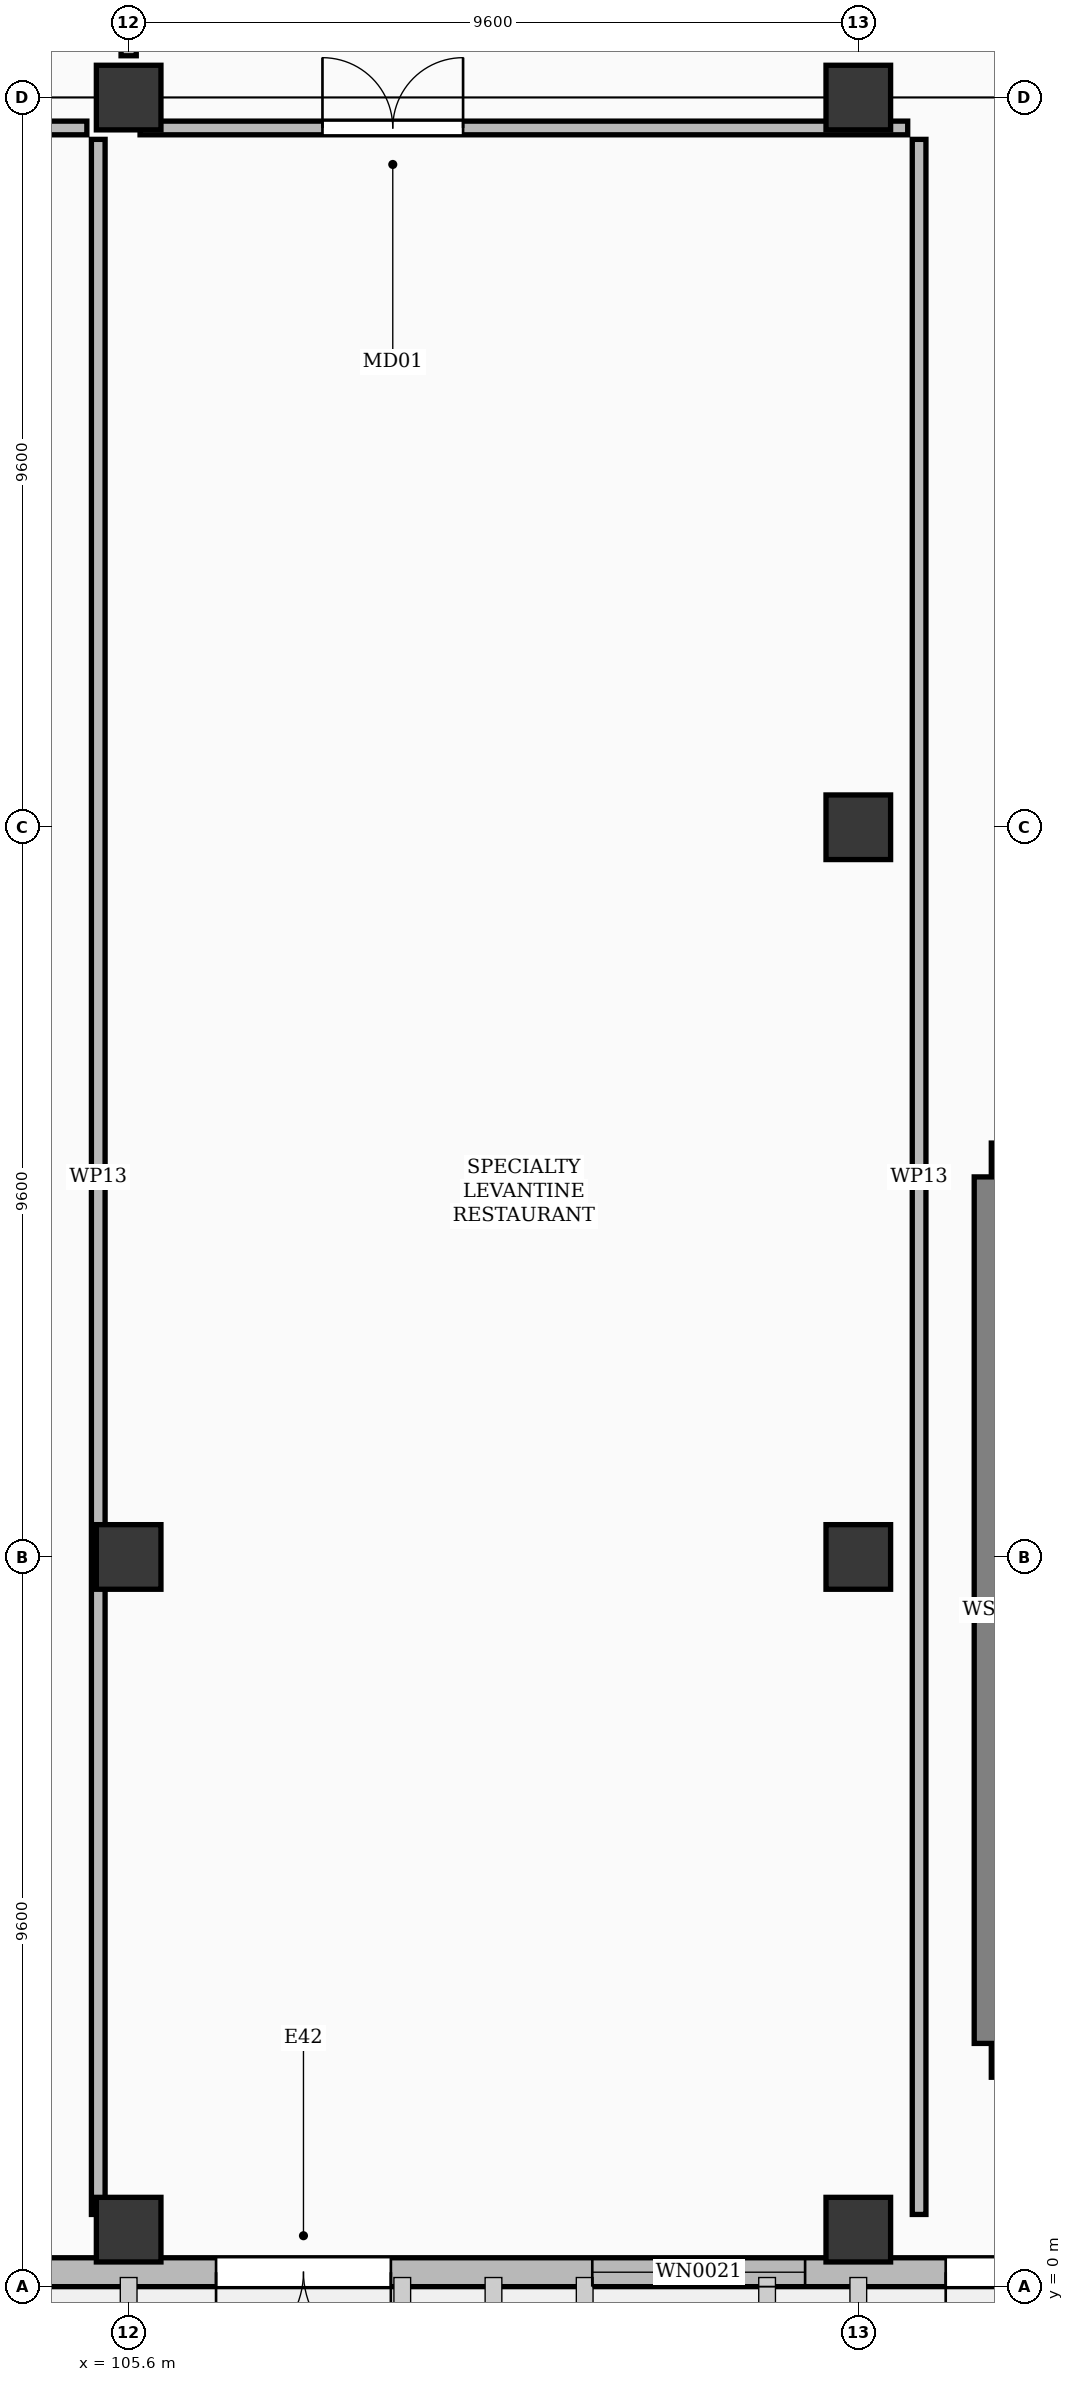
"""IFC4 building model, lengths in metres.
Left out: names, types, materials, properties, quantities, classifications, styles, units other than length and angle.
Written with IfcOpenShell. Run it as: python <this file> out.ifc"""

import sys

from ifc_helpers import new_model, si_unit, direction, frame, frame_2d, origin, origin_2d, place, context, subcontext, project, spatial, rectangle, extrude, element, fill, save


model = new_model("IFC4")
c1 = context("Model", 3, precision=1e-05, world=origin(), true_north=direction((0.0, 1.0)))
c2 = subcontext(c1, "Body", "Model", "MODEL_VIEW")
j1 = project(units=[si_unit("LENGTHUNIT", "METRE"), si_unit("PLANEANGLEUNIT", "RADIAN")], contexts=[c1])
p1 = place(None, origin())
s1 = spatial("IfcSite", under=j1, at=p1, CompositionType="ELEMENT")
p2 = place(p1, origin())
s2 = spatial("IfcBuilding", under=s1, at=p2, CompositionType="ELEMENT")
p3 = place(p2, origin())
s3 = spatial("IfcBuildingStorey", under=s2, at=p3, CompositionType="ELEMENT", Elevation=0.0)
for number, where, z_axis, x_axis in (
    (1, (105.6, 0.75, 0.0), (0.0, 0.0, 1.0), (1.0, 0.0, 0.0)),
    (2, (105.6, 9.6, 0.0), (0.0, 0.0, 1.0), (1.0, 0.0, 0.0)),
    (3, (105.6, 28.8, 0.0), (0.0, 0.0, 1.0), (1.0, 0.0, 0.0)),
    (4, (115.2, 0.75, 0.0), (0.0, 0.0, 1.0), (1.0, 0.0, 0.0)),
    (5, (115.2, 9.6, 0.0), (0.0, 0.0, 1.0), (1.0, 0.0, 0.0)),
    (6, (115.2, 19.2, 0.0), (0.0, 0.0, 1.0), (1.0, 0.0, 0.0)),
    (7, (115.2, 28.8, 0.0), (0.0, 0.0, 1.0), (1.0, 0.0, 0.0)),
):
    element("IfcColumn", number, at=place(p3, frame(where, z_axis=z_axis, x_axis=x_axis)), inside=s3, PredefinedType="COLUMN", context=c2, shape_type="SweptSolid", body=[
        extrude(rectangle(XDim=0.85, YDim=0.85, at=origin_2d()), origin(), (0.0, 0.0, 1.0), 6.0),
    ])
p4 = place(p3, frame((179.65, 0.19, 0.0), z_axis=(0.0, 0.0, 1.0), x_axis=(-1.0, 0.0, 0.0)))
e8 = element("IfcWall", 8, at=p4, inside=s3, PredefinedType="SOLIDWALL", context=c2, shape_type="SweptSolid", body=[
    extrude(rectangle(XDim=121.9, YDim=0.38, at=frame_2d((60.95, 0.0))), origin(), (0.0, 0.0, 1.0), 5.142),
])
p5 = place(p4, frame((3.4, 0.0, 0.0)))
e9 = element("IfcOpeningElement", 9, at=p5, cuts=e8, PredefinedType="OPENING", context=c2, shape_type="SweptSolid", body=[
    extrude(rectangle(XDim=2.3, YDim=2.4, at=frame_2d((1.15, 1.2))), frame((0.0, 0.202, 0.0), z_axis=(0.0, -1.0, 0.0), x_axis=(1.0, 0.0, 0.0)), (0.0, 0.0, 1.0), 0.404),
])
p6 = place(p4, frame((14.05, 0.0, 0.0)))
e10 = element("IfcOpeningElement", 10, at=p6, cuts=e8, PredefinedType="OPENING", context=c2, shape_type="SweptSolid", body=[
    extrude(rectangle(XDim=2.3, YDim=2.4, at=frame_2d((1.15, 1.2))), frame((0.0, 0.202, 0.0), z_axis=(0.0, -1.0, 0.0), x_axis=(1.0, 0.0, 0.0)), (0.0, 0.0, 1.0), 0.404),
])
p7 = place(p4, frame((22.6, 0.0, 0.0)))
e11 = element("IfcOpeningElement", 11, at=p7, cuts=e8, PredefinedType="OPENING", context=c2, shape_type="SweptSolid", body=[
    extrude(rectangle(XDim=2.3, YDim=2.4, at=frame_2d((1.15, 1.2))), frame((0.0, 0.202, 0.0), z_axis=(0.0, -1.0, 0.0), x_axis=(1.0, 0.0, 0.0)), (0.0, 0.0, 1.0), 0.404),
])
p8 = place(p4, frame((32.2, 0.0, 0.0)))
e12 = element("IfcOpeningElement", 12, at=p8, cuts=e8, PredefinedType="OPENING", context=c2, shape_type="SweptSolid", body=[
    extrude(rectangle(XDim=2.3, YDim=2.4, at=frame_2d((1.15, 1.2))), frame((0.0, 0.202, 0.0), z_axis=(0.0, -1.0, 0.0), x_axis=(1.0, 0.0, 0.0)), (0.0, 0.0, 1.0), 0.404),
])
p9 = place(p4, frame((41.8, 0.0, 0.0)))
e13 = element("IfcOpeningElement", 13, at=p9, cuts=e8, PredefinedType="OPENING", context=c2, shape_type="SweptSolid", body=[
    extrude(rectangle(XDim=2.3, YDim=2.4, at=frame_2d((1.15, 1.2))), frame((0.0, 0.202, 0.0), z_axis=(0.0, -1.0, 0.0), x_axis=(1.0, 0.0, 0.0)), (0.0, 0.0, 1.0), 0.404),
])
p10 = place(p4, frame((51.4, 0.0, 0.0)))
e14 = element("IfcOpeningElement", 14, at=p10, cuts=e8, PredefinedType="OPENING", context=c2, shape_type="SweptSolid", body=[
    extrude(rectangle(XDim=2.3, YDim=2.4, at=frame_2d((1.15, 1.2))), frame((0.0, 0.202, 0.0), z_axis=(0.0, -1.0, 0.0), x_axis=(1.0, 0.0, 0.0)), (0.0, 0.0, 1.0), 0.404),
])
p11 = place(p4, frame((61.0, 0.0, 0.0)))
e15 = element("IfcOpeningElement", 15, at=p11, cuts=e8, PredefinedType="OPENING", context=c2, shape_type="SweptSolid", body=[
    extrude(rectangle(XDim=2.3, YDim=2.4, at=frame_2d((1.15, 1.2))), frame((0.0, 0.202, 0.0), z_axis=(0.0, -1.0, 0.0), x_axis=(1.0, 0.0, 0.0)), (0.0, 0.0, 1.0), 0.404),
])
p12 = place(p4, frame((70.6, 0.0, 0.0)))
e16 = element("IfcOpeningElement", 16, at=p12, cuts=e8, PredefinedType="OPENING", context=c2, shape_type="SweptSolid", body=[
    extrude(rectangle(XDim=2.3, YDim=2.4, at=frame_2d((1.15, 1.2))), frame((0.0, 0.202, 0.0), z_axis=(0.0, -1.0, 0.0), x_axis=(1.0, 0.0, 0.0)), (0.0, 0.0, 1.0), 0.404),
])
p13 = place(p4, frame((80.2, 0.0, 0.0)))
e17 = element("IfcOpeningElement", 17, at=p13, cuts=e8, PredefinedType="OPENING", context=c2, shape_type="SweptSolid", body=[
    extrude(rectangle(XDim=2.3, YDim=2.4, at=frame_2d((1.15, 1.2))), frame((0.0, 0.202, 0.0), z_axis=(0.0, -1.0, 0.0), x_axis=(1.0, 0.0, 0.0)), (0.0, 0.0, 1.0), 0.404),
])
p14 = place(p4, frame((89.8, 0.0, 0.0)))
e18 = element("IfcOpeningElement", 18, at=p14, cuts=e8, PredefinedType="OPENING", context=c2, shape_type="SweptSolid", body=[
    extrude(rectangle(XDim=2.3, YDim=2.4, at=frame_2d((1.15, 1.2))), frame((0.0, 0.202, 0.0), z_axis=(0.0, -1.0, 0.0), x_axis=(1.0, 0.0, 0.0)), (0.0, 0.0, 1.0), 0.404),
])
p15 = place(p4, frame((99.4, 0.0, 0.0)))
e19 = element("IfcOpeningElement", 19, at=p15, cuts=e8, PredefinedType="OPENING", context=c2, shape_type="SweptSolid", body=[
    extrude(rectangle(XDim=2.3, YDim=2.4, at=frame_2d((1.15, 1.2))), frame((0.0, 0.202, 0.0), z_axis=(0.0, -1.0, 0.0), x_axis=(1.0, 0.0, 0.0)), (0.0, 0.0, 1.0), 0.404),
])
p16 = place(p4, frame((109.0, 0.0, 0.0)))
e20 = element("IfcOpeningElement", 20, at=p16, cuts=e8, PredefinedType="OPENING", context=c2, shape_type="SweptSolid", body=[
    extrude(rectangle(XDim=2.3, YDim=2.4, at=frame_2d((1.15, 1.2))), frame((0.0, 0.202, 0.0), z_axis=(0.0, -1.0, 0.0), x_axis=(1.0, 0.0, 0.0)), (0.0, 0.0, 1.0), 0.404),
])
p17 = place(p4, frame((7.2, 0.0, 0.8)))
e21 = element("IfcOpeningElement", 21, at=p17, cuts=e8, PredefinedType="OPENING", context=c2, shape_type="SweptSolid", body=[
    extrude(rectangle(XDim=1.6, YDim=2.8, at=frame_2d((0.8, 1.4))), frame((0.0, 0.202, 0.0), z_axis=(0.0, -1.0, 0.0), x_axis=(1.0, 0.0, 0.0)), (0.0, 0.0, 1.0), 0.404),
])
p18 = place(p4, frame((26.4, 0.0, 0.8)))
e22 = element("IfcOpeningElement", 22, at=p18, cuts=e8, PredefinedType="OPENING", context=c2, shape_type="SweptSolid", body=[
    extrude(rectangle(XDim=2.0, YDim=2.8, at=frame_2d((1.0, 1.4))), frame((0.0, 0.202, 0.0), z_axis=(0.0, -1.0, 0.0), x_axis=(1.0, 0.0, 0.0)), (0.0, 0.0, 1.0), 0.404),
])
p19 = place(p4, frame((45.95, 0.0, 0.8)))
e23 = element("IfcOpeningElement", 23, at=p19, cuts=e8, PredefinedType="OPENING", context=c2, shape_type="SweptSolid", body=[
    extrude(rectangle(XDim=2.4, YDim=3.0, at=frame_2d((1.2, 1.5))), frame((0.0, 0.202, 0.0), z_axis=(0.0, -1.0, 0.0), x_axis=(1.0, 0.0, 0.0)), (0.0, 0.0, 1.0), 0.404),
])
p20 = place(p4, frame((65.15, 0.0, 0.8)))
e24 = element("IfcOpeningElement", 24, at=p20, cuts=e8, PredefinedType="OPENING", context=c2, shape_type="SweptSolid", body=[
    extrude(rectangle(XDim=2.8, YDim=3.2, at=frame_2d((1.4, 1.6))), frame((0.0, 0.202, 0.0), z_axis=(0.0, -1.0, 0.0), x_axis=(1.0, 0.0, 0.0)), (0.0, 0.0, 1.0), 0.404),
])
p21 = place(p4, frame((84.35, 0.0, 0.8)))
e25 = element("IfcOpeningElement", 25, at=p21, cuts=e8, PredefinedType="OPENING", context=c2, shape_type="SweptSolid", body=[
    extrude(rectangle(XDim=1.4, YDim=2.5, at=frame_2d((0.7, 1.25))), frame((0.0, 0.202, 0.0), z_axis=(0.0, -1.0, 0.0), x_axis=(1.0, 0.0, 0.0)), (0.0, 0.0, 1.0), 0.404),
])
for number, where, z_axis, x_axis in (
    (26, (116.95, 2.98, 0.0), (0.0, 0.0, 1.0), (1.0, 0.0, 0.0)),
    (27, (116.95, 14.82, 0.0), (0.0, 0.0, 1.0), (1.0, 0.0, 0.0)),
):
    element("IfcWall", number, at=place(p3, frame(where, z_axis=z_axis, x_axis=x_axis)), inside=s3, PredefinedType="SHEAR", context=c2, shape_type="SweptSolid", body=[
        extrude(rectangle(XDim=5.15, YDim=0.45, at=frame_2d((2.575, 0.0))), origin(), (0.0, 0.0, 1.0), 5.7),
    ])
p22 = place(p3, frame((116.95, 3.2, 0.0), z_axis=(0.0, 0.0, 1.0), x_axis=(0.0, 1.0, 0.0)))
e28 = element("IfcWall", 28, at=p22, inside=s3, PredefinedType="SHEAR", context=c2, shape_type="SweptSolid", body=[
    extrude(rectangle(XDim=11.4, YDim=0.45, at=frame_2d((5.7, 0.0))), origin(), (0.0, 0.0, 1.0), 5.7),
])
p23 = place(p3, frame((105.6, 29.35, 0.0), z_axis=(0.0, 0.0, 1.0), x_axis=(0.0, 1.0, 0.0)))
e29 = element("IfcWall", 29, at=p23, inside=s3, PredefinedType="PARTITIONING", context=c2, shape_type="SweptSolid", body=[
    extrude(rectangle(XDim=11.1, YDim=0.2, at=frame_2d((5.55, 0.0))), origin(), (0.0, 0.0, 1.0), 4.692),
])
p24 = place(p3, frame((65.75, 28.4, 0.0), z_axis=(0.0, 0.0, 1.0), x_axis=(1.0, 0.0, 0.0)))
e30 = element("IfcWall", 30, at=p24, inside=s3, PredefinedType="PARTITIONING", context=c2, shape_type="SweptSolid", body=[
    extrude(rectangle(XDim=39.3, YDim=0.18, at=frame_2d((19.65, 0.0))), origin(), (0.0, 0.0, 1.0), 4.692),
])
p25 = place(p24, frame((11.85, 0.0, 0.0)))
e31 = element("IfcOpeningElement", 31, at=p25, cuts=e30, PredefinedType="OPENING", context=c2, shape_type="SweptSolid", body=[
    extrude(rectangle(XDim=1.85, YDim=2.35, at=frame_2d((0.925, 1.175))), frame((0.0, 0.102, 0.0), z_axis=(0.0, -1.0, 0.0), x_axis=(1.0, 0.0, 0.0)), (0.0, 0.0, 1.0), 0.204),
])
p26 = place(p24, frame((34.4, 0.0, 0.0)))
e32 = element("IfcOpeningElement", 32, at=p26, cuts=e30, PredefinedType="OPENING", context=c2, shape_type="SweptSolid", body=[
    extrude(rectangle(XDim=1.85, YDim=2.35, at=frame_2d((0.925, 1.175))), frame((0.0, 0.102, 0.0), z_axis=(0.0, -1.0, 0.0), x_axis=(1.0, 0.0, 0.0)), (0.0, 0.0, 1.0), 0.204),
])
p27 = place(p24, frame((21.55, 0.0, 0.0)))
e33 = element("IfcOpeningElement", 33, at=p27, cuts=e30, PredefinedType="OPENING", context=c2, shape_type="SweptSolid", body=[
    extrude(rectangle(XDim=1.85, YDim=2.35, at=frame_2d((0.925, 1.175))), frame((0.0, 0.102, 0.0), z_axis=(0.0, -1.0, 0.0), x_axis=(1.0, 0.0, 0.0)), (0.0, 0.0, 1.0), 0.204),
])
p28 = place(p3, frame((105.2, 0.95, 0.0), z_axis=(0.0, 0.0, 1.0), x_axis=(0.0, 1.0, 0.0)))
e34 = element("IfcWall", 34, at=p28, inside=s3, PredefinedType="PARTITIONING", context=c2, shape_type="SweptSolid", body=[
    extrude(rectangle(XDim=27.3, YDim=0.18, at=frame_2d((13.65, 0.0))), origin(), (0.0, 0.0, 1.0), 4.692),
])
p29 = place(p3, frame((105.75, 28.4, 0.0), z_axis=(0.0, 0.0, 1.0), x_axis=(1.0, 0.0, 0.0)))
e35 = element("IfcWall", 35, at=p29, inside=s3, PredefinedType="PARTITIONING", context=c2, shape_type="SweptSolid", body=[
    extrude(rectangle(XDim=10.1, YDim=0.18, at=frame_2d((5.05, 0.0))), origin(), (0.0, 0.0, 1.0), 4.692),
])
p30 = place(p29, frame((2.4, 0.0, 0.0)))
e36 = element("IfcOpeningElement", 36, at=p30, cuts=e35, PredefinedType="OPENING", context=c2, shape_type="SweptSolid", body=[
    extrude(rectangle(XDim=1.85, YDim=2.35, at=frame_2d((0.925, 1.175))), frame((0.0, 0.102, 0.0), z_axis=(0.0, -1.0, 0.0), x_axis=(1.0, 0.0, 0.0)), (0.0, 0.0, 1.0), 0.204),
])
p31 = place(p3, frame((116.0, 0.95, 0.0), z_axis=(0.0, 0.0, 1.0), x_axis=(0.0, 1.0, 0.0)))
e37 = element("IfcWall", 37, at=p31, inside=s3, PredefinedType="PARTITIONING", context=c2, shape_type="SweptSolid", body=[
    extrude(rectangle(XDim=27.3, YDim=0.18, at=frame_2d((13.65, 0.0))), origin(), (0.0, 0.0, 1.0), 4.692),
])
p32 = place(p11, origin())
e38 = element("IfcDoor", 38, at=p32, inside=s3, OperationType="DOUBLE_DOOR_SINGLE_SWING", PredefinedType="DOOR", context=c2, shape_type="SweptSolid", body=[
    extrude(rectangle(XDim=2.3, YDim=2.4, at=frame_2d((1.15, 1.2))), frame((0.0, 0.025, 0.0), z_axis=(0.0, -1.0, 0.0), x_axis=(1.0, 0.0, 0.0)), (0.0, 0.0, 1.0), 0.05),
])
fill(e15, e38)
p33 = place(p12, origin())
e39 = element("IfcDoor", 39, at=p33, inside=s3, OperationType="DOUBLE_DOOR_SINGLE_SWING", PredefinedType="DOOR", context=c2, shape_type="SweptSolid", body=[
    extrude(rectangle(XDim=2.3, YDim=2.4, at=frame_2d((1.15, 1.2))), frame((0.0, 0.025, 0.0), z_axis=(0.0, -1.0, 0.0), x_axis=(1.0, 0.0, 0.0)), (0.0, 0.0, 1.0), 0.05),
])
fill(e16, e39)
p34 = place(p20, origin())
e40 = element("IfcWindow", 40, at=p34, inside=s3, PartitioningType="SINGLE_PANEL", PredefinedType="WINDOW", context=c2, shape_type="SweptSolid", body=[
    extrude(rectangle(XDim=2.8, YDim=3.2, at=frame_2d((1.4, 1.6))), frame((0.0, 0.03, 0.0), z_axis=(0.0, -1.0, 0.0), x_axis=(1.0, 0.0, 0.0)), (0.0, 0.0, 1.0), 0.06),
])
fill(e24, e40)
p35 = place(p30, origin())
e41 = element("IfcDoor", 41, at=p35, inside=s3, OperationType="DOUBLE_DOOR_SINGLE_SWING", PredefinedType="DOOR", context=c2, shape_type="SweptSolid", body=[
    extrude(rectangle(XDim=1.85, YDim=2.35, at=frame_2d((0.925, 1.175))), frame((0.0, 0.025, 0.0), z_axis=(0.0, -1.0, 0.0), x_axis=(1.0, 0.0, 0.0)), (0.0, 0.0, 1.0), 0.05),
])
fill(e36, e41)
save(model, sys.argv[1])
